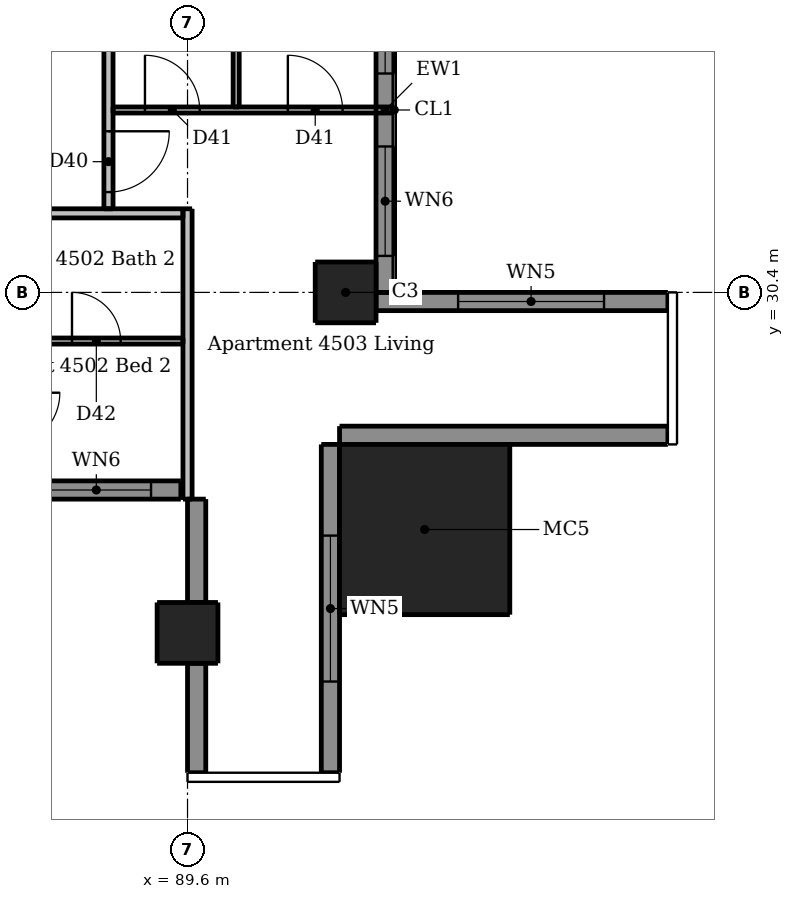
"""IFC4 building model, lengths in metres.
Left out: names, types, materials, properties, quantities, classifications, styles, units other than length and angle.
Written with IfcOpenShell. Run it as: python <this file> out.ifc"""

import sys

from ifc_helpers import new_model, si_unit, direction, frame, frame_2d, origin, origin_2d, place, context, subcontext, project, spatial, rectangle, extrude, element, fill, save


model = new_model("IFC4")
c1 = context("Model", 3, precision=1e-05, world=origin(), true_north=direction((0.0, 1.0)))
c2 = subcontext(c1, "Body", "Model", "MODEL_VIEW")
j1 = project(units=[si_unit("LENGTHUNIT", "METRE"), si_unit("PLANEANGLEUNIT", "RADIAN")], contexts=[c1])
p1 = place(None, origin())
s1 = spatial("IfcSite", under=j1, at=p1, CompositionType="ELEMENT")
p2 = place(p1, origin())
s2 = spatial("IfcBuilding", under=s1, at=p2, CompositionType="ELEMENT")
p3 = place(p2, frame((0.0, 0.0, 168.1)))
s3 = spatial("IfcBuildingStorey", under=s2, at=p3, CompositionType="ELEMENT", Elevation=168.1)
for number, where, z_axis, x_axis in (
    (1, (89.6, 24.8, 0.0), (0.0, 0.0, 1.0), (1.0, 0.0, 0.0)),
    (2, (92.2, 30.4, 0.0), (0.0, 0.0, 1.0), (1.0, 0.0, 0.0)),
):
    element("IfcColumn", number, at=place(p3, frame(where, z_axis=z_axis, x_axis=x_axis)), inside=s3, PredefinedType="COLUMN", context=c2, shape_type="SweptSolid", body=[
        extrude(rectangle(XDim=1.0, YDim=1.0, at=origin_2d()), origin(), (0.0, 0.0, 1.0), 3.05),
    ])
p4 = place(p3, frame((93.5, 26.5, 0.0), z_axis=(0.0, 0.0, 1.0), x_axis=(1.0, 0.0, 0.0)))
e3 = element("IfcColumn", 3, at=p4, inside=s3, PredefinedType="COLUMN", context=c2, shape_type="SweptSolid", body=[
    extrude(rectangle(XDim=2.8, YDim=2.8, at=origin_2d()), origin(), (0.0, 0.0, 1.0), 3.3),
])
p5 = place(p3, frame((89.75, 27.0, 0.0), z_axis=(0.0, 0.0, 1.0), x_axis=(0.0, -1.0, 0.0)))
e4 = element("IfcWall", 4, at=p5, inside=s3, PredefinedType="SOLIDWALL", context=c2, shape_type="SweptSolid", body=[
    extrude(rectangle(XDim=1.7, YDim=0.3, at=frame_2d((0.85, 0.0))), origin(), (0.0, 0.0, 1.0), 3.05),
])
p6 = place(p3, frame((89.75, 24.3, 0.0), z_axis=(0.0, 0.0, 1.0), x_axis=(0.0, -1.0, 0.0)))
e5 = element("IfcWall", 5, at=p6, inside=s3, PredefinedType="SOLIDWALL", context=c2, shape_type="SweptSolid", body=[
    extrude(rectangle(XDim=1.8, YDim=0.3, at=frame_2d((0.9, 0.0))), origin(), (0.0, 0.0, 1.0), 3.05),
])
p7 = place(p3, frame((91.95, 22.5, 0.0), z_axis=(0.0, 0.0, 1.0), x_axis=(0.0, 1.0, 0.0)))
e6 = element("IfcWall", 6, at=p7, inside=s3, PredefinedType="SOLIDWALL", context=c2, shape_type="SweptSolid", body=[
    extrude(rectangle(XDim=5.4, YDim=0.3, at=frame_2d((2.7, 0.0))), origin(), (0.0, 0.0, 1.0), 3.05),
])
p8 = place(p7, frame((1.5, 0.0, 0.15)))
e7 = element("IfcOpeningElement", 7, at=p8, cuts=e6, PredefinedType="OPENING", context=c2, shape_type="SweptSolid", body=[
    extrude(rectangle(XDim=2.4, YDim=2.1, at=frame_2d((1.2, 1.05))), frame((0.0, 0.16, 0.0), z_axis=(0.0, -1.0, 0.0), x_axis=(1.0, 0.0, 0.0)), (0.0, 0.0, 1.0), 0.32),
])
p9 = place(p3, frame((92.1, 28.05, 0.0), z_axis=(0.0, 0.0, 1.0), x_axis=(1.0, 0.0, 0.0)))
e8 = element("IfcWall", 8, at=p9, inside=s3, PredefinedType="SOLIDWALL", context=c2, shape_type="SweptSolid", body=[
    extrude(rectangle(XDim=5.4, YDim=0.3, at=frame_2d((2.7, 0.0))), origin(), (0.0, 0.0, 1.0), 3.05),
])
p10 = place(p3, frame((97.5, 30.25, 0.0), z_axis=(0.0, 0.0, 1.0), x_axis=(-1.0, 0.0, 0.0)))
e9 = element("IfcWall", 9, at=p10, inside=s3, PredefinedType="SOLIDWALL", context=c2, shape_type="SweptSolid", body=[
    extrude(rectangle(XDim=4.8, YDim=0.3, at=frame_2d((2.4, 0.0))), origin(), (0.0, 0.0, 1.0), 3.05),
])
p11 = place(p10, frame((1.05, 0.0, 0.15)))
e10 = element("IfcOpeningElement", 10, at=p11, cuts=e9, PredefinedType="OPENING", context=c2, shape_type="SweptSolid", body=[
    extrude(rectangle(XDim=2.4, YDim=2.1, at=frame_2d((1.2, 1.05))), frame((0.0, 0.16, 0.0), z_axis=(0.0, -1.0, 0.0), x_axis=(1.0, 0.0, 0.0)), (0.0, 0.0, 1.0), 0.32),
])
p12 = place(p3, frame((83.6, 27.15, 0.0), z_axis=(0.0, 0.0, 1.0), x_axis=(1.0, 0.0, 0.0)))
e11 = element("IfcWall", 11, at=p12, inside=s3, PredefinedType="SOLIDWALL", context=c2, shape_type="SweptSolid", body=[
    extrude(rectangle(XDim=5.89, YDim=0.3, at=frame_2d((2.945, 0.0))), origin(), (0.0, 0.0, 1.0), 3.05),
])
p13 = place(p12, frame((0.6, 0.0, 0.15)))
e12 = element("IfcOpeningElement", 12, at=p13, cuts=e11, PredefinedType="OPENING", context=c2, shape_type="SweptSolid", body=[
    extrude(rectangle(XDim=1.8, YDim=2.1, at=frame_2d((0.9, 1.05))), frame((0.0, 0.16, 0.0), z_axis=(0.0, -1.0, 0.0), x_axis=(1.0, 0.0, 0.0)), (0.0, 0.0, 1.0), 0.32),
])
p14 = place(p12, frame((3.6, 0.0, 0.15)))
e13 = element("IfcOpeningElement", 13, at=p14, cuts=e11, PredefinedType="OPENING", context=c2, shape_type="SweptSolid", body=[
    extrude(rectangle(XDim=1.8, YDim=2.1, at=frame_2d((0.9, 1.05))), frame((0.0, 0.16, 0.0), z_axis=(0.0, -1.0, 0.0), x_axis=(1.0, 0.0, 0.0)), (0.0, 0.0, 1.0), 0.32),
])
p15 = place(p3, frame((92.85, 30.4, 0.0), z_axis=(0.0, 0.0, 1.0), x_axis=(0.0, 1.0, 0.0)))
e14 = element("IfcWall", 14, at=p15, inside=s3, PredefinedType="SOLIDWALL", context=c2, shape_type="SweptSolid", body=[
    extrude(rectangle(XDim=6.0, YDim=0.3, at=frame_2d((3.0, 0.0))), origin(), (0.0, 0.0, 1.0), 3.05),
])
p16 = place(p15, frame((0.6, 0.0, 0.15)))
e15 = element("IfcOpeningElement", 15, at=p16, cuts=e14, PredefinedType="OPENING", context=c2, shape_type="SweptSolid", body=[
    extrude(rectangle(XDim=1.8, YDim=2.1, at=frame_2d((0.9, 1.05))), frame((0.0, 0.16, 0.0), z_axis=(0.0, -1.0, 0.0), x_axis=(1.0, 0.0, 0.0)), (0.0, 0.0, 1.0), 0.32),
])
p17 = place(p15, frame((3.6, 0.0, 0.15)))
e16 = element("IfcOpeningElement", 16, at=p17, cuts=e14, PredefinedType="OPENING", context=c2, shape_type="SweptSolid", body=[
    extrude(rectangle(XDim=1.8, YDim=2.1, at=frame_2d((0.9, 1.05))), frame((0.0, 0.16, 0.0), z_axis=(0.0, -1.0, 0.0), x_axis=(1.0, 0.0, 0.0)), (0.0, 0.0, 1.0), 0.32),
])
p18 = place(p3, frame((90.4, 33.45, 0.0), z_axis=(0.0, 0.0, 1.0), x_axis=(0.0, 1.0, 0.0)))
e17 = element("IfcWall", 17, at=p18, inside=s3, PredefinedType="PARTITIONING", context=c2, shape_type="SweptSolid", body=[
    extrude(rectangle(XDim=9.0, YDim=0.1, at=frame_2d((4.5, 0.0))), origin(), (0.0, 0.0, 1.0), 3.05),
])
p19 = place(p18, frame((3.75, 0.0, 0.0)))
e18 = element("IfcOpeningElement", 18, at=p19, cuts=e17, PredefinedType="OPENING", context=c2, shape_type="SweptSolid", body=[
    extrude(rectangle(XDim=0.8, YDim=2.1, at=frame_2d((0.4, 1.05))), frame((0.0, 0.06, 0.0), z_axis=(0.0, -1.0, 0.0), x_axis=(1.0, 0.0, 0.0)), (0.0, 0.0, 1.0), 0.12),
])
p20 = place(p18, frame((7.0, 0.0, 0.0)))
e19 = element("IfcOpeningElement", 19, at=p20, cuts=e17, PredefinedType="OPENING", context=c2, shape_type="SweptSolid", body=[
    extrude(rectangle(XDim=0.9, YDim=2.1, at=frame_2d((0.45, 1.05))), frame((0.0, 0.06, 0.0), z_axis=(0.0, -1.0, 0.0), x_axis=(1.0, 0.0, 0.0)), (0.0, 0.0, 1.0), 0.12),
])
p21 = place(p3, frame((88.375, 33.4, 0.0), z_axis=(0.0, 0.0, 1.0), x_axis=(1.0, 0.0, 0.0)))
e20 = element("IfcWall", 20, at=p21, inside=s3, PredefinedType="PARTITIONING", context=c2, shape_type="SweptSolid", body=[
    extrude(rectangle(XDim=4.625, YDim=0.1, at=frame_2d((2.312, 0.0))), origin(), (0.0, 0.0, 1.0), 3.05),
])
p22 = place(p21, frame((0.525, 0.0, 0.0)))
e21 = element("IfcOpeningElement", 21, at=p22, cuts=e20, PredefinedType="OPENING", context=c2, shape_type="SweptSolid", body=[
    extrude(rectangle(XDim=0.9, YDim=2.1, at=frame_2d((0.45, 1.05))), frame((0.0, 0.06, 0.0), z_axis=(0.0, -1.0, 0.0), x_axis=(1.0, 0.0, 0.0)), (0.0, 0.0, 1.0), 0.12),
])
p23 = place(p21, frame((2.875, 0.0, 0.0)))
e22 = element("IfcOpeningElement", 22, at=p23, cuts=e20, PredefinedType="OPENING", context=c2, shape_type="SweptSolid", body=[
    extrude(rectangle(XDim=0.9, YDim=2.1, at=frame_2d((0.45, 1.05))), frame((0.0, 0.06, 0.0), z_axis=(0.0, -1.0, 0.0), x_axis=(1.0, 0.0, 0.0)), (0.0, 0.0, 1.0), 0.12),
])
p24 = place(p3, frame((83.65, 29.6, 0.0), z_axis=(0.0, 0.0, 1.0), x_axis=(1.0, 0.0, 0.0)))
e23 = element("IfcWall", 23, at=p24, inside=s3, PredefinedType="PARTITIONING", context=c2, shape_type="SweptSolid", body=[
    extrude(rectangle(XDim=5.875, YDim=0.1, at=frame_2d((2.938, 0.0))), origin(), (0.0, 0.0, 1.0), 3.05),
])
p25 = place(p24, frame((1.0, 0.0, 0.0)))
e24 = element("IfcOpeningElement", 24, at=p25, cuts=e23, PredefinedType="OPENING", context=c2, shape_type="SweptSolid", body=[
    extrude(rectangle(XDim=0.9, YDim=2.1, at=frame_2d((0.45, 1.05))), frame((0.0, 0.06, 0.0), z_axis=(0.0, -1.0, 0.0), x_axis=(1.0, 0.0, 0.0)), (0.0, 0.0, 1.0), 0.12),
])
p26 = place(p24, frame((4.05, 0.0, 0.0)))
e25 = element("IfcOpeningElement", 25, at=p26, cuts=e23, PredefinedType="OPENING", context=c2, shape_type="SweptSolid", body=[
    extrude(rectangle(XDim=0.8, YDim=2.1, at=frame_2d((0.4, 1.05))), frame((0.0, 0.06, 0.0), z_axis=(0.0, -1.0, 0.0), x_axis=(1.0, 0.0, 0.0)), (0.0, 0.0, 1.0), 0.12),
])
p27 = place(p3, frame((88.3, 61.175, 0.0), z_axis=(0.0, 0.0, 1.0), x_axis=(0.0, -1.0, 0.0)))
e26 = element("IfcWall", 26, at=p27, inside=s3, PredefinedType="PARTITIONING", context=c2, shape_type="SweptSolid", body=[
    extrude(rectangle(XDim=29.4, YDim=0.15, at=frame_2d((14.7, 0.0))), origin(), (0.0, 0.0, 1.0), 3.05),
])
p28 = place(p27, frame((28.125, 0.0, 0.0)))
e27 = element("IfcOpeningElement", 27, at=p28, cuts=e26, PredefinedType="OPENING", context=c2, shape_type="SweptSolid", body=[
    extrude(rectangle(XDim=1.0, YDim=2.1, at=frame_2d((0.5, 1.05))), frame((0.0, 0.085, 0.0), z_axis=(0.0, -1.0, 0.0), x_axis=(1.0, 0.0, 0.0)), (0.0, 0.0, 1.0), 0.17),
])
p29 = place(p27, frame((13.775, 0.0, 0.0)))
e28 = element("IfcOpeningElement", 28, at=p29, cuts=e26, PredefinedType="OPENING", context=c2, shape_type="SweptSolid", body=[
    extrude(rectangle(XDim=1.0, YDim=2.1, at=frame_2d((0.5, 1.05))), frame((0.0, 0.085, 0.0), z_axis=(0.0, -1.0, 0.0), x_axis=(1.0, 0.0, 0.0)), (0.0, 0.0, 1.0), 0.17),
])
p30 = place(p27, frame((3.275, 0.0, 0.0)))
e29 = element("IfcOpeningElement", 29, at=p30, cuts=e26, PredefinedType="OPENING", context=c2, shape_type="SweptSolid", body=[
    extrude(rectangle(XDim=1.0, YDim=2.1, at=frame_2d((0.5, 1.05))), frame((0.0, 0.085, 0.0), z_axis=(0.0, -1.0, 0.0), x_axis=(1.0, 0.0, 0.0)), (0.0, 0.0, 1.0), 0.17),
])
p31 = place(p3, frame((89.6, 27.0, 0.0), z_axis=(0.0, 0.0, 1.0), x_axis=(0.0, 1.0, 0.0)))
e30 = element("IfcWall", 30, at=p31, inside=s3, PredefinedType="PARTITIONING", context=c2, shape_type="SweptSolid", body=[
    extrude(rectangle(XDim=4.775, YDim=0.15, at=frame_2d((2.387, 0.0))), origin(), (0.0, 0.0, 1.0), 2.51),
])
p32 = place(p3, frame((89.525, 31.7, 0.0), z_axis=(0.0, 0.0, 1.0), x_axis=(-1.0, 0.0, 0.0)))
e31 = element("IfcWall", 31, at=p32, inside=s3, PredefinedType="PARTITIONING", context=c2, shape_type="SweptSolid", body=[
    extrude(rectangle(XDim=30.55, YDim=0.15, at=frame_2d((15.275, 0.0))), origin(), (0.0, 0.0, 1.0), 3.05),
])
p33 = place(p32, frame((28.275, 0.0, 0.0)))
e32 = element("IfcOpeningElement", 32, at=p33, cuts=e31, PredefinedType="OPENING", context=c2, shape_type="SweptSolid", body=[
    extrude(rectangle(XDim=1.0, YDim=2.1, at=frame_2d((0.5, 1.05))), frame((0.0, 0.085, 0.0), z_axis=(0.0, -1.0, 0.0), x_axis=(1.0, 0.0, 0.0)), (0.0, 0.0, 1.0), 0.17),
])
p34 = place(p32, frame((9.925, 0.0, 0.0)))
e33 = element("IfcOpeningElement", 33, at=p34, cuts=e31, PredefinedType="OPENING", context=c2, shape_type="SweptSolid", body=[
    extrude(rectangle(XDim=1.0, YDim=2.1, at=frame_2d((0.5, 1.05))), frame((0.0, 0.085, 0.0), z_axis=(0.0, -1.0, 0.0), x_axis=(1.0, 0.0, 0.0)), (0.0, 0.0, 1.0), 0.17),
])
p35 = place(p8, origin())
e34 = element("IfcWindow", 34, at=p35, inside=s3, PartitioningType="DOUBLE_PANEL_VERTICAL", PredefinedType="WINDOW", context=c2, shape_type="SweptSolid", body=[
    extrude(rectangle(XDim=2.4, YDim=2.1, at=frame_2d((1.2, 1.05))), frame((0.0, 0.03, 0.0), z_axis=(0.0, -1.0, 0.0), x_axis=(1.0, 0.0, 0.0)), (0.0, 0.0, 1.0), 0.06),
])
fill(e7, e34)
p36 = place(p11, origin())
e35 = element("IfcWindow", 35, at=p36, inside=s3, PartitioningType="DOUBLE_PANEL_VERTICAL", PredefinedType="WINDOW", context=c2, shape_type="SweptSolid", body=[
    extrude(rectangle(XDim=2.4, YDim=2.1, at=frame_2d((1.2, 1.05))), frame((0.0, 0.03, 0.0), z_axis=(0.0, -1.0, 0.0), x_axis=(1.0, 0.0, 0.0)), (0.0, 0.0, 1.0), 0.06),
])
fill(e10, e35)
p37 = place(p14, origin())
e36 = element("IfcWindow", 36, at=p37, inside=s3, PartitioningType="DOUBLE_PANEL_VERTICAL", PredefinedType="WINDOW", context=c2, shape_type="SweptSolid", body=[
    extrude(rectangle(XDim=1.8, YDim=2.1, at=frame_2d((0.9, 1.05))), frame((0.0, 0.03, 0.0), z_axis=(0.0, -1.0, 0.0), x_axis=(1.0, 0.0, 0.0)), (0.0, 0.0, 1.0), 0.06),
])
fill(e13, e36)
p38 = place(p16, origin())
e37 = element("IfcWindow", 37, at=p38, inside=s3, PartitioningType="DOUBLE_PANEL_VERTICAL", PredefinedType="WINDOW", context=c2, shape_type="SweptSolid", body=[
    extrude(rectangle(XDim=1.8, YDim=2.1, at=frame_2d((0.9, 1.05))), frame((0.0, 0.03, 0.0), z_axis=(0.0, -1.0, 0.0), x_axis=(1.0, 0.0, 0.0)), (0.0, 0.0, 1.0), 0.06),
])
fill(e15, e37)
p39 = place(p17, origin())
e38 = element("IfcWindow", 38, at=p39, inside=s3, PartitioningType="DOUBLE_PANEL_VERTICAL", PredefinedType="WINDOW", context=c2, shape_type="SweptSolid", body=[
    extrude(rectangle(XDim=1.8, YDim=2.1, at=frame_2d((0.9, 1.05))), frame((0.0, 0.03, 0.0), z_axis=(0.0, -1.0, 0.0), x_axis=(1.0, 0.0, 0.0)), (0.0, 0.0, 1.0), 0.06),
])
fill(e16, e38)
p40 = place(p26, origin())
e39 = element("IfcDoor", 39, at=p40, inside=s3, OperationType="SINGLE_SWING_LEFT", PredefinedType="DOOR", context=c2, shape_type="SweptSolid", body=[
    extrude(rectangle(XDim=0.8, YDim=2.1, at=frame_2d((0.4, 1.05))), frame((0.0, 0.025, 0.0), z_axis=(0.0, -1.0, 0.0), x_axis=(1.0, 0.0, 0.0)), (0.0, 0.0, 1.0), 0.05),
])
fill(e25, e39)
p41 = place(p28, origin())
e40 = element("IfcDoor", 40, at=p41, inside=s3, OperationType="SINGLE_SWING_LEFT", PredefinedType="DOOR", context=c2, shape_type="SweptSolid", body=[
    extrude(rectangle(XDim=1.0, YDim=2.1, at=frame_2d((0.5, 1.05))), frame((0.0, 0.025, 0.0), z_axis=(0.0, -1.0, 0.0), x_axis=(1.0, 0.0, 0.0)), (0.0, 0.0, 1.0), 0.05),
])
fill(e27, e40)
p42 = place(p22, origin())
e41 = element("IfcDoor", 41, at=p42, inside=s3, OperationType="SINGLE_SWING_LEFT", PredefinedType="DOOR", context=c2, shape_type="SweptSolid", body=[
    extrude(rectangle(XDim=0.9, YDim=2.1, at=frame_2d((0.45, 1.05))), frame((0.0, 0.025, 0.0), z_axis=(0.0, -1.0, 0.0), x_axis=(1.0, 0.0, 0.0)), (0.0, 0.0, 1.0), 0.05),
])
fill(e21, e41)
p43 = place(p23, origin())
e42 = element("IfcDoor", 42, at=p43, inside=s3, OperationType="SINGLE_SWING_LEFT", PredefinedType="DOOR", context=c2, shape_type="SweptSolid", body=[
    extrude(rectangle(XDim=0.9, YDim=2.1, at=frame_2d((0.45, 1.05))), frame((0.0, 0.025, 0.0), z_axis=(0.0, -1.0, 0.0), x_axis=(1.0, 0.0, 0.0)), (0.0, 0.0, 1.0), 0.05),
])
fill(e22, e42)
save(model, sys.argv[1])
